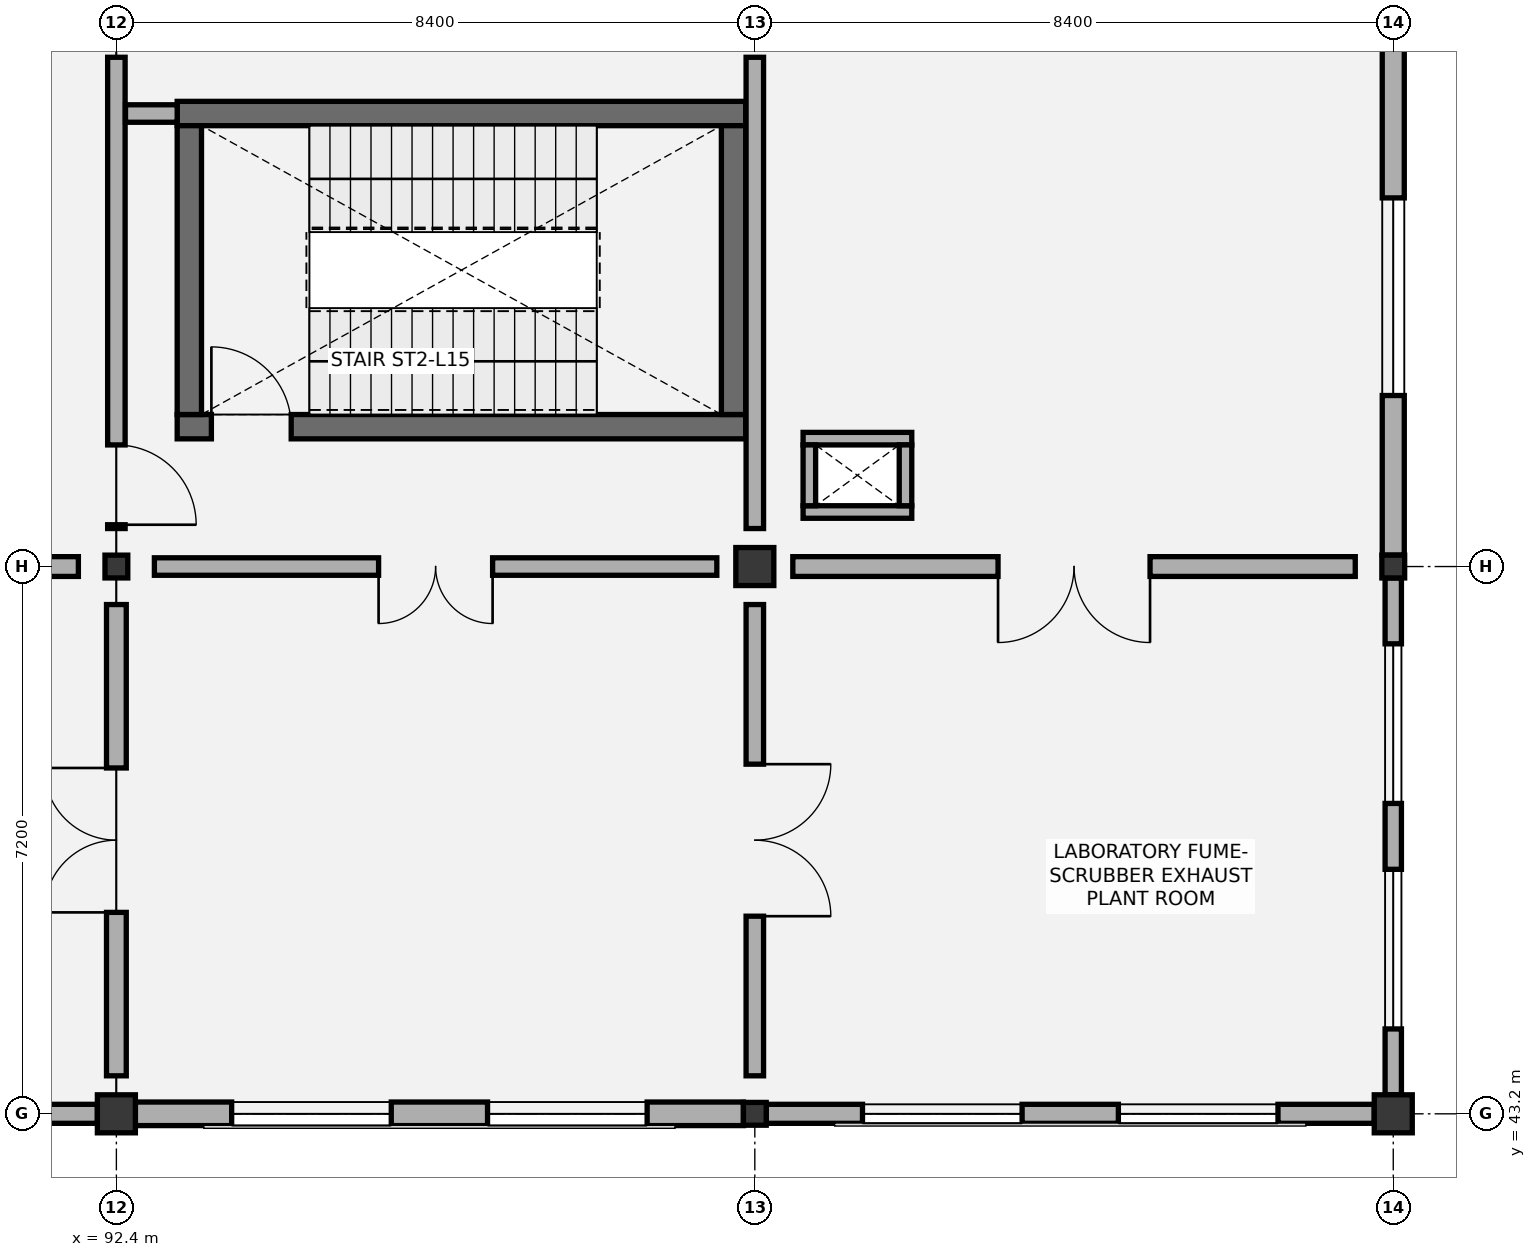
"""IFC4 building model, lengths in metres.
Left out: names, types, materials, properties, quantities, classifications, styles, units other than length and angle.
Written with IfcOpenShell. Run it as: python <this file> out.ifc"""

import sys

from ifc_helpers import new_model, si_unit, direction, frame, frame_2d, origin, origin_2d, place, context, subcontext, project, spatial, rectangle, i_section, extrude, element, fill, save


model = new_model("IFC4")
c1 = context("Model", 3, precision=1e-05, world=origin(), true_north=direction((0.0, 1.0)))
c2 = subcontext(c1, "Body", "Model", "MODEL_VIEW")
j1 = project(units=[si_unit("LENGTHUNIT", "METRE"), si_unit("PLANEANGLEUNIT", "RADIAN")], contexts=[c1])
p1 = place(None, origin())
s1 = spatial("IfcSite", under=j1, at=p1, CompositionType="ELEMENT")
p2 = place(p1, origin())
s2 = spatial("IfcBuilding", under=s1, at=p2, CompositionType="ELEMENT")
p3 = place(p2, frame((0.0, 0.0, 69.0)))
s3 = spatial("IfcBuildingStorey", under=s2, at=p3, CompositionType="ELEMENT", Elevation=69.0)
p4 = place(p3, frame((92.4, 43.2, 0.0), z_axis=(0.0, 0.0, 1.0), x_axis=(1.0, 0.0, 0.0)))
e1 = element("IfcColumn", 1, at=p4, inside=s3, PredefinedType="COLUMN", context=c2, shape_type="SweptSolid", body=[
    extrude(rectangle(XDim=0.5, YDim=0.5, at=origin_2d()), origin(), (0.0, 0.0, 1.0), 4.8),
])
for number, where, z_axis, x_axis in (
    (2, (92.4, 50.4, 0.0), (0.0, 0.0, 1.0), (1.0, 0.0, 0.0)),
    (3, (100.8, 43.2, 0.0), (0.0, 0.0, 1.0), (1.0, 0.0, 0.0)),
):
    element("IfcColumn", number, at=place(p3, frame(where, z_axis=z_axis, x_axis=x_axis)), inside=s3, PredefinedType="COLUMN", context=c2, shape_type="SweptSolid", body=[
        extrude(i_section(OverallWidth=0.3, OverallDepth=0.3, WebThickness=0.011, FlangeThickness=0.019, FilletRadius=0.027, at=origin_2d()), origin(), (0.0, 0.0, 1.0), 4.8),
    ])
for number, where, z_axis, x_axis in (
    (4, (100.8, 50.4, 0.0), (0.0, 0.0, 1.0), (1.0, 0.0, 0.0)),
    (5, (109.2, 43.2, 0.0), (0.0, 0.0, 1.0), (1.0, 0.0, 0.0)),
):
    element("IfcColumn", number, at=place(p3, frame(where, z_axis=z_axis, x_axis=x_axis)), inside=s3, PredefinedType="COLUMN", context=c2, shape_type="SweptSolid", body=[
        extrude(rectangle(XDim=0.5, YDim=0.5, at=origin_2d()), origin(), (0.0, 0.0, 1.0), 4.8),
    ])
p5 = place(p3, frame((109.2, 50.4, 0.0), z_axis=(0.0, 0.0, 1.0), x_axis=(1.0, 0.0, 0.0)))
e6 = element("IfcColumn", 6, at=p5, inside=s3, PredefinedType="COLUMN", context=c2, shape_type="SweptSolid", body=[
    extrude(i_section(OverallWidth=0.3, OverallDepth=0.3, WebThickness=0.011, FlangeThickness=0.019, FilletRadius=0.027, at=origin_2d()), origin(), (0.0, 0.0, 1.0), 4.8),
])
p6 = place(p3, frame((93.2, 52.24, 0.0), z_axis=(0.0, 0.0, 1.0), x_axis=(1.0, 0.0, 0.0)))
e7 = element("IfcWall", 7, at=p6, inside=s3, PredefinedType="SHEAR", context=c2, shape_type="SweptSolid", body=[
    extrude(rectangle(XDim=7.48, YDim=0.32, at=frame_2d((3.74, 0.0))), origin(), (0.0, 0.0, 1.0), 4.6),
])
p7 = place(p6, frame((0.45, 0.0, 0.0)))
e8 = element("IfcOpeningElement", 8, at=p7, cuts=e7, PredefinedType="OPENING", context=c2, shape_type="SweptSolid", body=[
    extrude(rectangle(XDim=1.05, YDim=2.15, at=frame_2d((0.525, 1.075))), frame((0.0, 0.17, 0.0), z_axis=(0.0, -1.0, 0.0), x_axis=(1.0, 0.0, 0.0)), (0.0, 0.0, 1.0), 0.34),
])
p8 = place(p3, frame((93.2, 56.36, 0.0), z_axis=(0.0, 0.0, 1.0), x_axis=(1.0, 0.0, 0.0)))
e9 = element("IfcWall", 9, at=p8, inside=s3, PredefinedType="SHEAR", context=c2, shape_type="SweptSolid", body=[
    extrude(rectangle(XDim=7.48, YDim=0.32, at=frame_2d((3.74, 0.0))), origin(), (0.0, 0.0, 1.0), 4.6),
])
for number, where, z_axis, x_axis in (
    (10, (93.36, 52.4, 0.0), (0.0, 0.0, 1.0), (0.0, 1.0, 0.0)),
    (11, (100.52, 52.4, 0.0), (0.0, 0.0, 1.0), (0.0, 1.0, 0.0)),
):
    element("IfcWall", number, at=place(p3, frame(where, z_axis=z_axis, x_axis=x_axis)), inside=s3, PredefinedType="SHEAR", context=c2, shape_type="SweptSolid", body=[
        extrude(rectangle(XDim=3.8, YDim=0.32, at=frame_2d((1.9, 0.0))), origin(), (0.0, 0.0, 1.0), 4.6),
    ])
p9 = place(p3, frame((84.15, 43.2, 0.0), z_axis=(0.0, 0.0, 1.0), x_axis=(1.0, 0.0, 0.0)))
e12 = element("IfcWall", 12, at=p9, inside=s3, PredefinedType="SOLIDWALL", context=c2, shape_type="SweptSolid", body=[
    extrude(rectangle(XDim=8.0, YDim=0.25, at=frame_2d((4.0, 0.0))), origin(), (0.0, 0.0, 1.0), 4.365),
])
p10 = place(p9, frame((1.267, 0.0, 1.45)))
e13 = element("IfcOpeningElement", 13, at=p10, cuts=e12, PredefinedType="OPENING", context=c2, shape_type="SweptSolid", body=[
    extrude(rectangle(XDim=2.1, YDim=1.35, at=frame_2d((1.05, 0.675))), frame((0.0, 0.135, 0.0), z_axis=(0.0, -1.0, 0.0), x_axis=(1.0, 0.0, 0.0)), (0.0, 0.0, 1.0), 0.27),
])
p11 = place(p9, frame((4.633, 0.0, 1.45)))
e14 = element("IfcOpeningElement", 14, at=p11, cuts=e12, PredefinedType="OPENING", context=c2, shape_type="SweptSolid", body=[
    extrude(rectangle(XDim=2.1, YDim=1.35, at=frame_2d((1.05, 0.675))), frame((0.0, 0.135, 0.0), z_axis=(0.0, -1.0, 0.0), x_axis=(1.0, 0.0, 0.0)), (0.0, 0.0, 1.0), 0.27),
])
p12 = place(p3, frame((92.65, 43.2, 0.0), z_axis=(0.0, 0.0, 1.0), x_axis=(1.0, 0.0, 0.0)))
e15 = element("IfcWall", 15, at=p12, inside=s3, PredefinedType="SOLIDWALL", context=c2, shape_type="SweptSolid", body=[
    extrude(rectangle(XDim=8.0, YDim=0.31, at=frame_2d((4.0, 0.0))), origin(), (0.0, 0.0, 1.0), 4.365),
])
p13 = place(p12, frame((1.267, 0.0, 1.45)))
e16 = element("IfcOpeningElement", 16, at=p13, cuts=e15, PredefinedType="OPENING", context=c2, shape_type="SweptSolid", body=[
    extrude(rectangle(XDim=2.1, YDim=1.35, at=frame_2d((1.05, 0.675))), frame((0.0, 0.165, 0.0), z_axis=(0.0, -1.0, 0.0), x_axis=(1.0, 0.0, 0.0)), (0.0, 0.0, 1.0), 0.33),
])
p14 = place(p12, frame((4.633, 0.0, 1.45)))
e17 = element("IfcOpeningElement", 17, at=p14, cuts=e15, PredefinedType="OPENING", context=c2, shape_type="SweptSolid", body=[
    extrude(rectangle(XDim=2.1, YDim=1.35, at=frame_2d((1.05, 0.675))), frame((0.0, 0.165, 0.0), z_axis=(0.0, -1.0, 0.0), x_axis=(1.0, 0.0, 0.0)), (0.0, 0.0, 1.0), 0.33),
])
p15 = place(p3, frame((100.95, 43.2, 0.0), z_axis=(0.0, 0.0, 1.0), x_axis=(1.0, 0.0, 0.0)))
e18 = element("IfcWall", 18, at=p15, inside=s3, PredefinedType="SOLIDWALL", context=c2, shape_type="SweptSolid", body=[
    extrude(rectangle(XDim=8.0, YDim=0.25, at=frame_2d((4.0, 0.0))), origin(), (0.0, 0.0, 1.0), 4.365),
])
p16 = place(p15, frame((1.267, 0.0, 1.45)))
e19 = element("IfcOpeningElement", 19, at=p16, cuts=e18, PredefinedType="OPENING", context=c2, shape_type="SweptSolid", body=[
    extrude(rectangle(XDim=2.1, YDim=1.35, at=frame_2d((1.05, 0.675))), frame((0.0, 0.135, 0.0), z_axis=(0.0, -1.0, 0.0), x_axis=(1.0, 0.0, 0.0)), (0.0, 0.0, 1.0), 0.27),
])
p17 = place(p15, frame((4.633, 0.0, 1.45)))
e20 = element("IfcOpeningElement", 20, at=p17, cuts=e18, PredefinedType="OPENING", context=c2, shape_type="SweptSolid", body=[
    extrude(rectangle(XDim=2.1, YDim=1.35, at=frame_2d((1.05, 0.675))), frame((0.0, 0.135, 0.0), z_axis=(0.0, -1.0, 0.0), x_axis=(1.0, 0.0, 0.0)), (0.0, 0.0, 1.0), 0.27),
])
p18 = place(p3, frame((109.2, 43.45, 0.0), z_axis=(0.0, 0.0, 1.0), x_axis=(0.0, 1.0, 0.0)))
e21 = element("IfcWall", 21, at=p18, inside=s3, PredefinedType="SOLIDWALL", context=c2, shape_type="SweptSolid", body=[
    extrude(rectangle(XDim=6.8, YDim=0.215, at=frame_2d((3.4, 0.0))), origin(), (0.0, 0.0, 1.0), 4.045),
])
p19 = place(p18, frame((0.867, 0.0, 1.45)))
e22 = element("IfcOpeningElement", 22, at=p19, cuts=e21, PredefinedType="OPENING", context=c2, shape_type="SweptSolid", body=[
    extrude(rectangle(XDim=2.1, YDim=1.35, at=frame_2d((1.05, 0.675))), frame((0.0, 0.117, 0.0), z_axis=(0.0, -1.0, 0.0), x_axis=(1.0, 0.0, 0.0)), (0.0, 0.0, 1.0), 0.235),
])
p20 = place(p18, frame((3.833, 0.0, 1.45)))
e23 = element("IfcOpeningElement", 23, at=p20, cuts=e21, PredefinedType="OPENING", context=c2, shape_type="SweptSolid", body=[
    extrude(rectangle(XDim=2.1, YDim=1.35, at=frame_2d((1.05, 0.675))), frame((0.0, 0.117, 0.0), z_axis=(0.0, -1.0, 0.0), x_axis=(1.0, 0.0, 0.0)), (0.0, 0.0, 1.0), 0.235),
])
p21 = place(p3, frame((109.2, 50.55, 0.0), z_axis=(0.0, 0.0, 1.0), x_axis=(0.0, 1.0, 0.0)))
e24 = element("IfcWall", 24, at=p21, inside=s3, PredefinedType="SOLIDWALL", context=c2, shape_type="SweptSolid", body=[
    extrude(rectangle(XDim=6.8, YDim=0.29, at=frame_2d((3.4, 0.0))), origin(), (0.0, 0.0, 1.0), 4.045),
])
p22 = place(p21, frame((2.1, 0.0, 1.45)))
e25 = element("IfcOpeningElement", 25, at=p22, cuts=e24, PredefinedType="OPENING", context=c2, shape_type="SweptSolid", body=[
    extrude(rectangle(XDim=2.6, YDim=1.2, at=frame_2d((1.3, 0.6))), frame((0.0, 0.155, 0.0), z_axis=(0.0, -1.0, 0.0), x_axis=(1.0, 0.0, 0.0)), (0.0, 0.0, 1.0), 0.31),
])
for number, where, z_axis, x_axis in (
    (26, (101.435, 51.117, 0.0), (0.0, 0.0, 1.0), (1.0, 0.0, 0.0)),
    (27, (101.435, 52.083, 0.0), (0.0, 0.0, 1.0), (1.0, 0.0, 0.0)),
):
    element("IfcWall", number, at=place(p3, frame(where, z_axis=z_axis, x_axis=x_axis)), inside=s3, PredefinedType="PARTITIONING", context=c2, shape_type="SweptSolid", body=[
        extrude(rectangle(XDim=1.43, YDim=0.165, at=frame_2d((0.715, 0.0))), origin(), (0.0, 0.0, 1.0), 4.6),
    ])
for number, where, z_axis, x_axis in (
    (28, (101.518, 51.2, 0.0), (0.0, 0.0, 1.0), (0.0, 1.0, 0.0)),
    (29, (102.782, 51.2, 0.0), (0.0, 0.0, 1.0), (0.0, 1.0, 0.0)),
):
    element("IfcWall", number, at=place(p3, frame(where, z_axis=z_axis, x_axis=x_axis)), inside=s3, PredefinedType="PARTITIONING", context=c2, shape_type="SweptSolid", body=[
        extrude(rectangle(XDim=0.8, YDim=0.165, at=frame_2d((0.4, 0.0))), origin(), (0.0, 0.0, 1.0), 4.6),
    ])
p23 = place(p3, frame((92.4, 43.7, 0.0), z_axis=(0.0, 0.0, 1.0), x_axis=(0.0, 1.0, 0.0)))
e30 = element("IfcWall", 30, at=p23, inside=s3, PredefinedType="PARTITIONING", context=c2, shape_type="SweptSolid", body=[
    extrude(rectangle(XDim=6.2, YDim=0.26, at=frame_2d((3.1, 0.0))), origin(), (0.0, 0.0, 1.0), 4.305),
])
p24 = place(p23, frame((2.15, 0.0, 0.0)))
e31 = element("IfcOpeningElement", 31, at=p24, cuts=e30, PredefinedType="OPENING", context=c2, shape_type="SweptSolid", body=[
    extrude(rectangle(XDim=1.9, YDim=2.3, at=frame_2d((0.95, 1.15))), frame((0.0, 0.14, 0.0), z_axis=(0.0, -1.0, 0.0), x_axis=(1.0, 0.0, 0.0)), (0.0, 0.0, 1.0), 0.28),
])
p25 = place(p3, frame((84.5, 50.4, 0.0), z_axis=(0.0, 0.0, 1.0), x_axis=(1.0, 0.0, 0.0)))
e32 = element("IfcWall", 32, at=p25, inside=s3, PredefinedType="PARTITIONING", context=c2, shape_type="SweptSolid", body=[
    extrude(rectangle(XDim=7.4, YDim=0.26, at=frame_2d((3.7, 0.0))), origin(), (0.0, 0.0, 1.0), 4.325),
])
p26 = place(p25, frame((2.7, 0.0, 0.0)))
e33 = element("IfcOpeningElement", 33, at=p26, cuts=e32, PredefinedType="OPENING", context=c2, shape_type="SweptSolid", body=[
    extrude(rectangle(XDim=2.0, YDim=2.35, at=frame_2d((1.0, 1.175))), frame((0.0, 0.14, 0.0), z_axis=(0.0, -1.0, 0.0), x_axis=(1.0, 0.0, 0.0)), (0.0, 0.0, 1.0), 0.28),
])
p27 = place(p3, frame((92.4, 50.9, 0.0), z_axis=(0.0, 0.0, 1.0), x_axis=(0.0, 1.0, 0.0)))
e34 = element("IfcWall", 34, at=p27, inside=s3, PredefinedType="PARTITIONING", context=c2, shape_type="SweptSolid", body=[
    extrude(rectangle(XDim=6.2, YDim=0.23, at=frame_2d((3.1, 0.0))), origin(), (0.0, 0.0, 1.0), 4.095),
])
p28 = place(p27, frame((0.05, 0.0, 0.0)))
e35 = element("IfcOpeningElement", 35, at=p28, cuts=e34, PredefinedType="OPENING", context=c2, shape_type="SweptSolid", body=[
    extrude(rectangle(XDim=1.05, YDim=2.15, at=frame_2d((0.525, 1.075))), frame((0.0, 0.125, 0.0), z_axis=(0.0, -1.0, 0.0), x_axis=(1.0, 0.0, 0.0)), (0.0, 0.0, 1.0), 0.25),
])
p29 = place(p3, frame((100.8, 43.7, 0.0), z_axis=(0.0, 0.0, 1.0), x_axis=(0.0, 1.0, 0.0)))
e36 = element("IfcWall", 36, at=p29, inside=s3, PredefinedType="PARTITIONING", context=c2, shape_type="SweptSolid", body=[
    extrude(rectangle(XDim=6.2, YDim=0.23, at=frame_2d((3.1, 0.0))), origin(), (0.0, 0.0, 1.0), 4.095),
])
p30 = place(p29, frame((2.1, 0.0, 0.0)))
e37 = element("IfcOpeningElement", 37, at=p30, cuts=e36, PredefinedType="OPENING", context=c2, shape_type="SweptSolid", body=[
    extrude(rectangle(XDim=2.0, YDim=2.35, at=frame_2d((1.0, 1.175))), frame((0.0, 0.125, 0.0), z_axis=(0.0, -1.0, 0.0), x_axis=(1.0, 0.0, 0.0)), (0.0, 0.0, 1.0), 0.25),
])
p31 = place(p3, frame((92.9, 50.4, 0.0), z_axis=(0.0, 0.0, 1.0), x_axis=(1.0, 0.0, 0.0)))
e38 = element("IfcWall", 38, at=p31, inside=s3, PredefinedType="PARTITIONING", context=c2, shape_type="SweptSolid", body=[
    extrude(rectangle(XDim=7.4, YDim=0.23, at=frame_2d((3.7, 0.0))), origin(), (0.0, 0.0, 1.0), 3.995),
])
p32 = place(p31, frame((2.95, 0.0, 0.0)))
e39 = element("IfcOpeningElement", 39, at=p32, cuts=e38, PredefinedType="OPENING", context=c2, shape_type="SweptSolid", body=[
    extrude(rectangle(XDim=1.5, YDim=2.15, at=frame_2d((0.75, 1.075))), frame((0.0, 0.125, 0.0), z_axis=(0.0, -1.0, 0.0), x_axis=(1.0, 0.0, 0.0)), (0.0, 0.0, 1.0), 0.25),
])
p33 = place(p3, frame((100.8, 50.9, 0.0), z_axis=(0.0, 0.0, 1.0), x_axis=(0.0, 1.0, 0.0)))
e40 = element("IfcWall", 40, at=p33, inside=s3, PredefinedType="PARTITIONING", context=c2, shape_type="SweptSolid", body=[
    extrude(rectangle(XDim=6.2, YDim=0.23, at=frame_2d((3.1, 0.0))), origin(), (0.0, 0.0, 1.0), 4.095),
])
p34 = place(p3, frame((92.52, 56.36, 0.0), z_axis=(0.0, 0.0, 1.0), x_axis=(1.0, 0.0, 0.0)))
e41 = element("IfcWall", 41, at=p34, inside=s3, PredefinedType="PARTITIONING", context=c2, shape_type="SweptSolid", body=[
    extrude(rectangle(XDim=0.68, YDim=0.23, at=frame_2d((0.34, 0.0))), origin(), (0.0, 0.0, 1.0), 4.6),
])
p35 = place(p3, frame((101.3, 50.4, 0.0), z_axis=(0.0, 0.0, 1.0), x_axis=(1.0, 0.0, 0.0)))
e42 = element("IfcWall", 42, at=p35, inside=s3, PredefinedType="PARTITIONING", context=c2, shape_type="SweptSolid", body=[
    extrude(rectangle(XDim=7.4, YDim=0.26, at=frame_2d((3.7, 0.0))), origin(), (0.0, 0.0, 1.0), 4.095),
])
p36 = place(p35, frame((2.7, 0.0, 0.0)))
e43 = element("IfcOpeningElement", 43, at=p36, cuts=e42, PredefinedType="OPENING", context=c2, shape_type="SweptSolid", body=[
    extrude(rectangle(XDim=2.0, YDim=2.35, at=frame_2d((1.0, 1.175))), frame((0.0, 0.14, 0.0), z_axis=(0.0, -1.0, 0.0), x_axis=(1.0, 0.0, 0.0)), (0.0, 0.0, 1.0), 0.28),
])
p37 = place(p13, origin())
e44 = element("IfcWindow", 44, at=p37, inside=s3, PartitioningType="SINGLE_PANEL", PredefinedType="WINDOW", context=c2, shape_type="SweptSolid", body=[
    extrude(rectangle(XDim=2.1, YDim=1.35, at=frame_2d((1.05, 0.675))), frame((0.0, 0.03, 0.0), z_axis=(0.0, -1.0, 0.0), x_axis=(1.0, 0.0, 0.0)), (0.0, 0.0, 1.0), 0.06),
])
fill(e16, e44)
p38 = place(p14, origin())
e45 = element("IfcWindow", 45, at=p38, inside=s3, PartitioningType="SINGLE_PANEL", PredefinedType="WINDOW", context=c2, shape_type="SweptSolid", body=[
    extrude(rectangle(XDim=2.1, YDim=1.35, at=frame_2d((1.05, 0.675))), frame((0.0, 0.03, 0.0), z_axis=(0.0, -1.0, 0.0), x_axis=(1.0, 0.0, 0.0)), (0.0, 0.0, 1.0), 0.06),
])
fill(e17, e45)
p39 = place(p16, origin())
e46 = element("IfcWindow", 46, at=p39, inside=s3, PartitioningType="SINGLE_PANEL", PredefinedType="WINDOW", context=c2, shape_type="SweptSolid", body=[
    extrude(rectangle(XDim=2.1, YDim=1.35, at=frame_2d((1.05, 0.675))), frame((0.0, 0.03, 0.0), z_axis=(0.0, -1.0, 0.0), x_axis=(1.0, 0.0, 0.0)), (0.0, 0.0, 1.0), 0.06),
])
fill(e19, e46)
p40 = place(p17, origin())
e47 = element("IfcWindow", 47, at=p40, inside=s3, PartitioningType="SINGLE_PANEL", PredefinedType="WINDOW", context=c2, shape_type="SweptSolid", body=[
    extrude(rectangle(XDim=2.1, YDim=1.35, at=frame_2d((1.05, 0.675))), frame((0.0, 0.03, 0.0), z_axis=(0.0, -1.0, 0.0), x_axis=(1.0, 0.0, 0.0)), (0.0, 0.0, 1.0), 0.06),
])
fill(e20, e47)
p41 = place(p19, origin())
e48 = element("IfcWindow", 48, at=p41, inside=s3, PartitioningType="SINGLE_PANEL", PredefinedType="WINDOW", context=c2, shape_type="SweptSolid", body=[
    extrude(rectangle(XDim=2.1, YDim=1.35, at=frame_2d((1.05, 0.675))), frame((0.0, 0.03, 0.0), z_axis=(0.0, -1.0, 0.0), x_axis=(1.0, 0.0, 0.0)), (0.0, 0.0, 1.0), 0.06),
])
fill(e22, e48)
p42 = place(p20, origin())
e49 = element("IfcWindow", 49, at=p42, inside=s3, PartitioningType="SINGLE_PANEL", PredefinedType="WINDOW", context=c2, shape_type="SweptSolid", body=[
    extrude(rectangle(XDim=2.1, YDim=1.35, at=frame_2d((1.05, 0.675))), frame((0.0, 0.03, 0.0), z_axis=(0.0, -1.0, 0.0), x_axis=(1.0, 0.0, 0.0)), (0.0, 0.0, 1.0), 0.06),
])
fill(e23, e49)
p43 = place(p22, origin())
e50 = element("IfcWindow", 50, at=p43, inside=s3, PartitioningType="SINGLE_PANEL", PredefinedType="WINDOW", context=c2, shape_type="SweptSolid", body=[
    extrude(rectangle(XDim=2.6, YDim=1.2, at=frame_2d((1.3, 0.6))), frame((0.0, 0.03, 0.0), z_axis=(0.0, -1.0, 0.0), x_axis=(1.0, 0.0, 0.0)), (0.0, 0.0, 1.0), 0.06),
])
fill(e25, e50)
p44 = place(p7, origin())
e51 = element("IfcDoor", 51, at=p44, inside=s3, OperationType="SINGLE_SWING_LEFT", PredefinedType="DOOR", context=c2, shape_type="SweptSolid", body=[
    extrude(rectangle(XDim=1.05, YDim=2.15, at=frame_2d((0.525, 1.075))), frame((0.0, 0.025, 0.0), z_axis=(0.0, -1.0, 0.0), x_axis=(1.0, 0.0, 0.0)), (0.0, 0.0, 1.0), 0.05),
])
fill(e8, e51)
p45 = place(p24, origin())
e52 = element("IfcDoor", 52, at=p45, inside=s3, OperationType="DOUBLE_DOOR_SINGLE_SWING", PredefinedType="DOOR", context=c2, shape_type="SweptSolid", body=[
    extrude(rectangle(XDim=1.9, YDim=2.3, at=frame_2d((0.95, 1.15))), frame((0.0, 0.025, 0.0), z_axis=(0.0, -1.0, 0.0), x_axis=(1.0, 0.0, 0.0)), (0.0, 0.0, 1.0), 0.05),
])
fill(e31, e52)
p46 = place(p28, frame((1.05, 0.0, 0.0), z_axis=(0.0, 0.0, 1.0), x_axis=(-1.0, 0.0, 0.0)))
e53 = element("IfcDoor", 53, at=p46, inside=s3, OperationType="SINGLE_SWING_RIGHT", PredefinedType="DOOR", context=c2, shape_type="SweptSolid", body=[
    extrude(rectangle(XDim=1.05, YDim=2.15, at=frame_2d((0.525, 1.075))), frame((0.0, 0.025, 0.0), z_axis=(0.0, -1.0, 0.0), x_axis=(1.0, 0.0, 0.0)), (0.0, 0.0, 1.0), 0.05),
])
fill(e35, e53)
p47 = place(p30, frame((2.0, 0.0, 0.0), z_axis=(0.0, 0.0, 1.0), x_axis=(-1.0, 0.0, 0.0)))
e54 = element("IfcDoor", 54, at=p47, inside=s3, OperationType="DOUBLE_DOOR_SINGLE_SWING", PredefinedType="DOOR", context=c2, shape_type="SweptSolid", body=[
    extrude(rectangle(XDim=2.0, YDim=2.35, at=frame_2d((1.0, 1.175))), frame((0.0, 0.025, 0.0), z_axis=(0.0, -1.0, 0.0), x_axis=(1.0, 0.0, 0.0)), (0.0, 0.0, 1.0), 0.05),
])
fill(e37, e54)
p48 = place(p32, frame((1.5, 0.0, 0.0), z_axis=(0.0, 0.0, 1.0), x_axis=(-1.0, 0.0, 0.0)))
e55 = element("IfcDoor", 55, at=p48, inside=s3, OperationType="DOUBLE_DOOR_SINGLE_SWING", PredefinedType="DOOR", context=c2, shape_type="SweptSolid", body=[
    extrude(rectangle(XDim=1.5, YDim=2.15, at=frame_2d((0.75, 1.075))), frame((0.0, 0.025, 0.0), z_axis=(0.0, -1.0, 0.0), x_axis=(1.0, 0.0, 0.0)), (0.0, 0.0, 1.0), 0.05),
])
fill(e39, e55)
p49 = place(p36, frame((2.0, 0.0, 0.0), z_axis=(0.0, 0.0, 1.0), x_axis=(-1.0, 0.0, 0.0)))
e56 = element("IfcDoor", 56, at=p49, inside=s3, OperationType="DOUBLE_DOOR_SINGLE_SWING", PredefinedType="DOOR", context=c2, shape_type="SweptSolid", body=[
    extrude(rectangle(XDim=2.0, YDim=2.35, at=frame_2d((1.0, 1.175))), frame((0.0, 0.025, 0.0), z_axis=(0.0, -1.0, 0.0), x_axis=(1.0, 0.0, 0.0)), (0.0, 0.0, 1.0), 0.05),
])
fill(e43, e56)
save(model, sys.argv[1])
